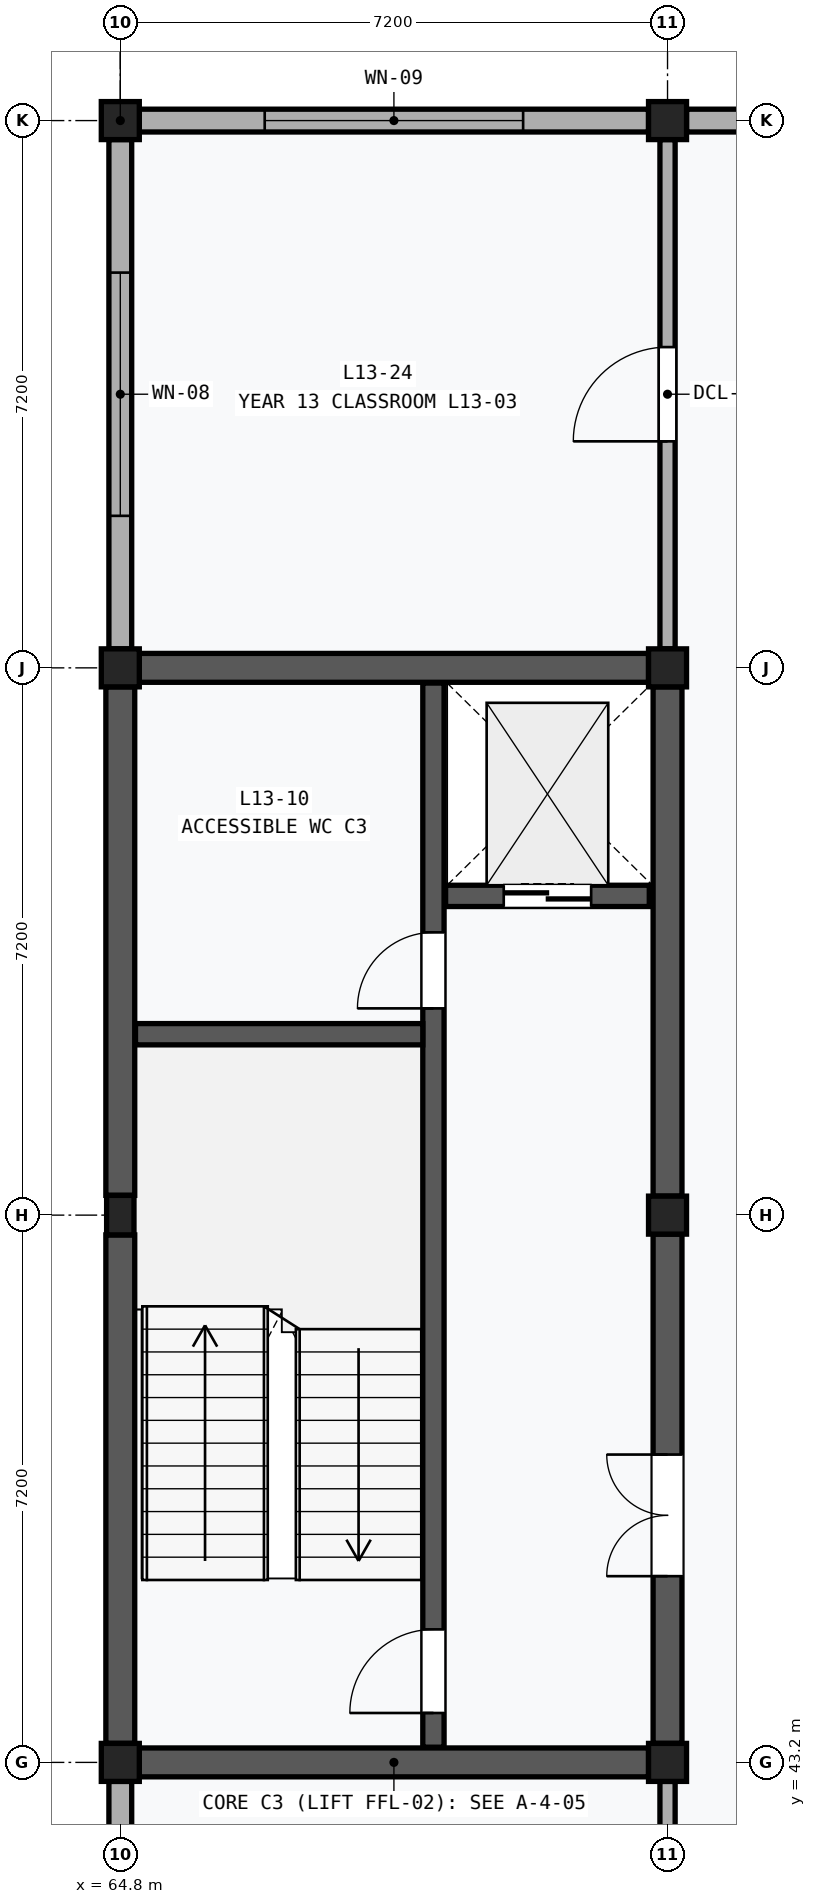
"""IFC4 building model, lengths in metres.
Left out: names, types, materials, properties, quantities, classifications, styles, units other than length and angle.
Written with IfcOpenShell. Run it as: python <this file> out.ifc"""

import sys

from ifc_helpers import new_model, si_unit, direction, frame, frame_2d, origin, origin_2d, place, context, subcontext, project, spatial, rectangle, extrude, element, fill, save


model = new_model("IFC4")
c1 = context("Model", 3, precision=1e-05, world=origin(), true_north=direction((0.0, 1.0)))
c2 = subcontext(c1, "Body", "Model", "MODEL_VIEW")
j1 = project(units=[si_unit("LENGTHUNIT", "METRE"), si_unit("PLANEANGLEUNIT", "RADIAN")], contexts=[c1])
p1 = place(None, origin())
s1 = spatial("IfcSite", under=j1, at=p1, CompositionType="ELEMENT")
p2 = place(p1, origin())
s2 = spatial("IfcBuilding", under=s1, at=p2, CompositionType="ELEMENT")
p3 = place(p2, frame((0.0, 0.0, 55.0)))
s3 = spatial("IfcBuildingStorey", under=s2, at=p3, CompositionType="ELEMENT", Elevation=55.0)
p4 = place(p3, frame((64.8, 43.2, 0.0), z_axis=(0.0, 0.0, 1.0), x_axis=(1.0, 0.0, 0.0)))
e1 = element("IfcColumn", 1, at=p4, inside=s3, PredefinedType="COLUMN", context=c2, shape_type="SweptSolid", body=[
    extrude(rectangle(XDim=0.5, YDim=0.5, at=origin_2d()), origin(), (0.0, 0.0, 1.0), 4.0),
])
p5 = place(p3, frame((64.8, 50.4, 0.0), z_axis=(0.0, 0.0, 1.0), x_axis=(1.0, 0.0, 0.0)))
e2 = element("IfcColumn", 2, at=p5, inside=s3, PredefinedType="PILASTER", context=c2, shape_type="SweptSolid", body=[
    extrude(rectangle(XDim=0.36, YDim=0.52, at=origin_2d()), origin(), (0.0, 0.0, 1.0), 4.0),
])
for number, where, z_axis, x_axis in (
    (3, (64.8, 57.6, 0.0), (0.0, 0.0, 1.0), (1.0, 0.0, 0.0)),
    (4, (64.8, 64.8, 0.0), (0.0, 0.0, 1.0), (1.0, 0.0, 0.0)),
    (5, (72.0, 43.2, 0.0), (0.0, 0.0, 1.0), (1.0, 0.0, 0.0)),
    (6, (72.0, 50.4, 0.0), (0.0, 0.0, 1.0), (1.0, 0.0, 0.0)),
    (7, (72.0, 57.6, 0.0), (0.0, 0.0, 1.0), (1.0, 0.0, 0.0)),
    (8, (72.0, 64.8, 0.0), (0.0, 0.0, 1.0), (1.0, 0.0, 0.0)),
):
    element("IfcColumn", number, at=place(p3, frame(where, z_axis=z_axis, x_axis=x_axis)), inside=s3, PredefinedType="COLUMN", context=c2, shape_type="SweptSolid", body=[
        extrude(rectangle(XDim=0.5, YDim=0.5, at=origin_2d()), origin(), (0.0, 0.0, 1.0), 4.0),
    ])
p6 = place(p3, frame((64.8, 36.25, 0.0), z_axis=(0.0, 0.0, 1.0), x_axis=(0.0, 1.0, 0.0)))
e9 = element("IfcWall", 9, at=p6, inside=s3, PredefinedType="SOLIDWALL", context=c2, shape_type="SweptSolid", body=[
    extrude(rectangle(XDim=6.7, YDim=0.3, at=frame_2d((3.35, 0.0))), origin(), (0.0, 0.0, 1.0), 3.17),
])
p7 = place(p3, frame((65.05, 64.8, 0.0), z_axis=(0.0, 0.0, 1.0), x_axis=(1.0, 0.0, 0.0)))
e10 = element("IfcWall", 10, at=p7, inside=s3, PredefinedType="SOLIDWALL", context=c2, shape_type="SweptSolid", body=[
    extrude(rectangle(XDim=6.7, YDim=0.3, at=frame_2d((3.35, 0.0))), origin(), (0.0, 0.0, 1.0), 3.17),
])
p8 = place(p7, frame((1.65, 0.0, 0.9)))
e11 = element("IfcOpeningElement", 11, at=p8, cuts=e10, PredefinedType="OPENING", context=c2, shape_type="SweptSolid", body=[
    extrude(rectangle(XDim=3.4, YDim=1.8, at=frame_2d((1.7, 0.9))), frame((0.0, 0.162, 0.0), z_axis=(0.0, -1.0, 0.0), x_axis=(1.0, 0.0, 0.0)), (0.0, 0.0, 1.0), 0.324),
])
p9 = place(p3, frame((64.8, 57.85, 0.0), z_axis=(0.0, 0.0, 1.0), x_axis=(0.0, 1.0, 0.0)))
e12 = element("IfcWall", 12, at=p9, inside=s3, PredefinedType="SOLIDWALL", context=c2, shape_type="SweptSolid", body=[
    extrude(rectangle(XDim=6.7, YDim=0.3, at=frame_2d((3.35, 0.0))), origin(), (0.0, 0.0, 1.0), 3.17),
])
p10 = place(p9, frame((1.75, 0.0, 0.9)))
e13 = element("IfcOpeningElement", 13, at=p10, cuts=e12, PredefinedType="OPENING", context=c2, shape_type="SweptSolid", body=[
    extrude(rectangle(XDim=3.2, YDim=1.8, at=frame_2d((1.6, 0.9))), frame((0.0, 0.162, 0.0), z_axis=(0.0, -1.0, 0.0), x_axis=(1.0, 0.0, 0.0)), (0.0, 0.0, 1.0), 0.324),
])
p11 = place(p3, frame((72.25, 64.8, 0.0), z_axis=(0.0, 0.0, 1.0), x_axis=(1.0, 0.0, 0.0)))
e14 = element("IfcWall", 14, at=p11, inside=s3, PredefinedType="SOLIDWALL", context=c2, shape_type="SweptSolid", body=[
    extrude(rectangle(XDim=6.77, YDim=0.3, at=frame_2d((3.385, 0.0))), origin(), (0.0, 0.0, 1.0), 3.17),
])
p12 = place(p11, frame((2.485, 0.0, 0.85)))
e15 = element("IfcOpeningElement", 15, at=p12, cuts=e14, PredefinedType="OPENING", context=c2, shape_type="SweptSolid", body=[
    extrude(rectangle(XDim=1.8, YDim=2.0, at=frame_2d((0.9, 1.0))), frame((0.0, 0.162, 0.0), z_axis=(0.0, -1.0, 0.0), x_axis=(1.0, 0.0, 0.0)), (0.0, 0.0, 1.0), 0.324),
])
p13 = place(p3, frame((64.8, 43.45, 0.0), z_axis=(0.0, 0.0, 1.0), x_axis=(0.0, 1.0, 0.0)))
e16 = element("IfcWall", 16, at=p13, inside=s3, PredefinedType="SHEAR", context=c2, shape_type="SweptSolid", body=[
    extrude(rectangle(XDim=6.69, YDim=0.38, at=frame_2d((3.345, 0.0))), origin(), (0.0, 0.0, 1.0), 3.17),
])
p14 = place(p3, frame((64.8, 50.66, 0.0), z_axis=(0.0, 0.0, 1.0), x_axis=(0.0, 1.0, 0.0)))
e17 = element("IfcWall", 17, at=p14, inside=s3, PredefinedType="SHEAR", context=c2, shape_type="SweptSolid", body=[
    extrude(rectangle(XDim=6.69, YDim=0.38, at=frame_2d((3.345, 0.0))), origin(), (0.0, 0.0, 1.0), 3.17),
])
p15 = place(p3, frame((72.0, 43.45, 0.0), z_axis=(0.0, 0.0, 1.0), x_axis=(0.0, 1.0, 0.0)))
e18 = element("IfcWall", 18, at=p15, inside=s3, PredefinedType="SHEAR", context=c2, shape_type="SweptSolid", body=[
    extrude(rectangle(XDim=6.7, YDim=0.38, at=frame_2d((3.35, 0.0))), origin(), (0.0, 0.0, 1.0), 3.09),
])
p16 = place(p15, frame((2.2, 0.0, 0.0)))
e19 = element("IfcOpeningElement", 19, at=p16, cuts=e18, PredefinedType="OPENING", context=c2, shape_type="SweptSolid", body=[
    extrude(rectangle(XDim=1.6, YDim=2.2, at=frame_2d((0.8, 1.1))), frame((0.0, 0.202, 0.0), z_axis=(0.0, -1.0, 0.0), x_axis=(1.0, 0.0, 0.0)), (0.0, 0.0, 1.0), 0.404),
])
p17 = place(p3, frame((72.0, 50.65, 0.0), z_axis=(0.0, 0.0, 1.0), x_axis=(0.0, 1.0, 0.0)))
e20 = element("IfcWall", 20, at=p17, inside=s3, PredefinedType="SHEAR", context=c2, shape_type="SweptSolid", body=[
    extrude(rectangle(XDim=6.7, YDim=0.38, at=frame_2d((3.35, 0.0))), origin(), (0.0, 0.0, 1.0), 3.09),
])
for number, where, z_axis, x_axis in (
    (21, (65.05, 43.2, 0.0), (0.0, 0.0, 1.0), (1.0, 0.0, 0.0)),
    (22, (65.05, 57.6, 0.0), (0.0, 0.0, 1.0), (1.0, 0.0, 0.0)),
):
    element("IfcWall", number, at=place(p3, frame(where, z_axis=z_axis, x_axis=x_axis)), inside=s3, PredefinedType="SHEAR", context=c2, shape_type="SweptSolid", body=[
        extrude(rectangle(XDim=6.7, YDim=0.38, at=frame_2d((3.35, 0.0))), origin(), (0.0, 0.0, 1.0), 3.09),
    ])
p18 = place(p3, frame((68.92, 43.4, 0.0), z_axis=(0.0, 0.0, 1.0), x_axis=(0.0, 1.0, 0.0)))
e23 = element("IfcWall", 23, at=p18, inside=s3, PredefinedType="SHEAR", context=c2, shape_type="SweptSolid", body=[
    extrude(rectangle(XDim=14.0, YDim=0.28, at=frame_2d((7.0, 0.0))), origin(), (0.0, 0.0, 1.0), 3.77),
])
p19 = place(p18, frame((0.45, 0.0, 0.0)))
e24 = element("IfcOpeningElement", 24, at=p19, cuts=e23, PredefinedType="OPENING", context=c2, shape_type="SweptSolid", body=[
    extrude(rectangle(XDim=1.1, YDim=2.15, at=frame_2d((0.55, 1.075))), frame((0.0, 0.152, 0.0), z_axis=(0.0, -1.0, 0.0), x_axis=(1.0, 0.0, 0.0)), (0.0, 0.0, 1.0), 0.304),
])
p20 = place(p18, frame((9.72, 0.0, 0.0)))
e25 = element("IfcOpeningElement", 25, at=p20, cuts=e23, PredefinedType="OPENING", context=c2, shape_type="SweptSolid", body=[
    extrude(rectangle(XDim=1.0, YDim=2.15, at=frame_2d((0.5, 1.075))), frame((0.0, 0.152, 0.0), z_axis=(0.0, -1.0, 0.0), x_axis=(1.0, 0.0, 0.0)), (0.0, 0.0, 1.0), 0.304),
])
p21 = place(p3, frame((65.0, 52.78, 0.0), z_axis=(0.0, 0.0, 1.0), x_axis=(1.0, 0.0, 0.0)))
e26 = element("IfcWall", 26, at=p21, inside=s3, PredefinedType="SHEAR", context=c2, shape_type="SweptSolid", body=[
    extrude(rectangle(XDim=3.78, YDim=0.28, at=frame_2d((1.89, 0.0))), origin(), (0.0, 0.0, 1.0), 3.77),
])
p22 = place(p3, frame((69.08, 54.6, 0.0), z_axis=(0.0, 0.0, 1.0), x_axis=(1.0, 0.0, 0.0)))
e27 = element("IfcWall", 27, at=p22, inside=s3, PredefinedType="SHEAR", context=c2, shape_type="SweptSolid", body=[
    extrude(rectangle(XDim=2.68, YDim=0.28, at=frame_2d((1.34, 0.0))), origin(), (0.0, 0.0, 1.0), 3.77),
])
p23 = place(p22, frame((0.765, 0.0, 0.0)))
e28 = element("IfcOpeningElement", 28, at=p23, cuts=e27, PredefinedType="OPENING", context=c2, shape_type="SweptSolid", body=[
    extrude(rectangle(XDim=1.15, YDim=2.2, at=frame_2d((0.575, 1.1))), frame((0.0, 0.152, 0.0), z_axis=(0.0, -1.0, 0.0), x_axis=(1.0, 0.0, 0.0)), (0.0, 0.0, 1.0), 0.304),
])
p24 = place(p3, frame((72.0, 36.25, 0.0), z_axis=(0.0, 0.0, 1.0), x_axis=(0.0, 1.0, 0.0)))
e29 = element("IfcWall", 29, at=p24, inside=s3, PredefinedType="PARTITIONING", context=c2, shape_type="SweptSolid", body=[
    extrude(rectangle(XDim=6.7, YDim=0.2, at=frame_2d((3.35, 0.0))), origin(), (0.0, 0.0, 1.0), 3.09),
])
p25 = place(p24, frame((2.75, 0.0, 0.0)))
e30 = element("IfcOpeningElement", 30, at=p25, cuts=e29, PredefinedType="OPENING", context=c2, shape_type="SweptSolid", body=[
    extrude(rectangle(XDim=1.2, YDim=2.24, at=frame_2d((0.6, 1.12))), frame((0.0, 0.112, 0.0), z_axis=(0.0, -1.0, 0.0), x_axis=(1.0, 0.0, 0.0)), (0.0, 0.0, 1.0), 0.224),
])
p26 = place(p3, frame((72.0, 57.85, 0.0), z_axis=(0.0, 0.0, 1.0), x_axis=(0.0, 1.0, 0.0)))
e31 = element("IfcWall", 31, at=p26, inside=s3, PredefinedType="PARTITIONING", context=c2, shape_type="SweptSolid", body=[
    extrude(rectangle(XDim=6.7, YDim=0.2, at=frame_2d((3.35, 0.0))), origin(), (0.0, 0.0, 1.0), 3.09),
])
p27 = place(p26, frame((2.73, 0.0, 0.0)))
e32 = element("IfcOpeningElement", 32, at=p27, cuts=e31, PredefinedType="OPENING", context=c2, shape_type="SweptSolid", body=[
    extrude(rectangle(XDim=1.24, YDim=2.26, at=frame_2d((0.62, 1.13))), frame((0.0, 0.112, 0.0), z_axis=(0.0, -1.0, 0.0), x_axis=(1.0, 0.0, 0.0)), (0.0, 0.0, 1.0), 0.224),
])
p28 = place(p8, origin())
e33 = element("IfcWindow", 33, at=p28, inside=s3, PartitioningType="SINGLE_PANEL", PredefinedType="WINDOW", context=c2, shape_type="SweptSolid", body=[
    extrude(rectangle(XDim=3.4, YDim=1.8, at=frame_2d((1.7, 0.9))), frame((0.0, 0.03, 0.0), z_axis=(0.0, -1.0, 0.0), x_axis=(1.0, 0.0, 0.0)), (0.0, 0.0, 1.0), 0.06),
])
fill(e11, e33)
p29 = place(p10, origin())
e34 = element("IfcWindow", 34, at=p29, inside=s3, PartitioningType="SINGLE_PANEL", PredefinedType="WINDOW", context=c2, shape_type="SweptSolid", body=[
    extrude(rectangle(XDim=3.2, YDim=1.8, at=frame_2d((1.6, 0.9))), frame((0.0, 0.03, 0.0), z_axis=(0.0, -1.0, 0.0), x_axis=(1.0, 0.0, 0.0)), (0.0, 0.0, 1.0), 0.06),
])
fill(e13, e34)
p30 = place(p16, origin())
e35 = element("IfcDoor", 35, at=p30, inside=s3, OperationType="DOUBLE_DOOR_SINGLE_SWING", PredefinedType="DOOR", context=c2, shape_type="SweptSolid", body=[
    extrude(rectangle(XDim=1.6, YDim=2.2, at=frame_2d((0.8, 1.1))), frame((0.0, 0.025, 0.0), z_axis=(0.0, -1.0, 0.0), x_axis=(1.0, 0.0, 0.0)), (0.0, 0.0, 1.0), 0.05),
])
fill(e19, e35)
p31 = place(p19, origin())
e36 = element("IfcDoor", 36, at=p31, inside=s3, OperationType="SINGLE_SWING_LEFT", PredefinedType="DOOR", context=c2, shape_type="SweptSolid", body=[
    extrude(rectangle(XDim=1.1, YDim=2.15, at=frame_2d((0.55, 1.075))), frame((0.0, 0.025, 0.0), z_axis=(0.0, -1.0, 0.0), x_axis=(1.0, 0.0, 0.0)), (0.0, 0.0, 1.0), 0.05),
])
fill(e24, e36)
p32 = place(p20, origin())
e37 = element("IfcDoor", 37, at=p32, inside=s3, OperationType="SINGLE_SWING_LEFT", PredefinedType="DOOR", context=c2, shape_type="SweptSolid", body=[
    extrude(rectangle(XDim=1.0, YDim=2.15, at=frame_2d((0.5, 1.075))), frame((0.0, 0.025, 0.0), z_axis=(0.0, -1.0, 0.0), x_axis=(1.0, 0.0, 0.0)), (0.0, 0.0, 1.0), 0.05),
])
fill(e25, e37)
p33 = place(p23, frame((1.15, 0.0, 0.0), z_axis=(0.0, 0.0, 1.0), x_axis=(-1.0, 0.0, 0.0)))
e38 = element("IfcDoor", 38, at=p33, inside=s3, OperationType="DOUBLE_DOOR_SLIDING", PredefinedType="DOOR", context=c2, shape_type="SweptSolid", body=[
    extrude(rectangle(XDim=1.15, YDim=2.2, at=frame_2d((0.575, 1.1))), frame((0.0, 0.025, 0.0), z_axis=(0.0, -1.0, 0.0), x_axis=(1.0, 0.0, 0.0)), (0.0, 0.0, 1.0), 0.05),
])
fill(e28, e38)
p34 = place(p27, origin())
e39 = element("IfcDoor", 39, at=p34, inside=s3, OperationType="SINGLE_SWING_LEFT", PredefinedType="DOOR", context=c2, shape_type="SweptSolid", body=[
    extrude(rectangle(XDim=1.24, YDim=2.26, at=frame_2d((0.62, 1.13))), frame((0.0, 0.025, 0.0), z_axis=(0.0, -1.0, 0.0), x_axis=(1.0, 0.0, 0.0)), (0.0, 0.0, 1.0), 0.05),
])
fill(e32, e39)
save(model, sys.argv[1])
